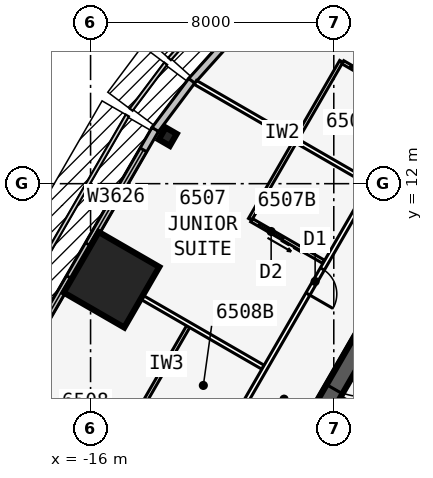
"""IFC4 building model, lengths in metres.
Left out: names, types, materials, properties, quantities, classifications, styles, units other than length and angle.
Written with IfcOpenShell. Run it as: python <this file> out.ifc"""

import sys

from ifc_helpers import new_model, si_unit, direction, frame, frame_2d, origin, origin_2d, place, context, subcontext, project, spatial, rectangle, i_section, extrude, element, fill, save


model = new_model("IFC4")
c1 = context("Model", 3, precision=1e-05, world=origin(), true_north=direction((0.0, 1.0)))
c2 = subcontext(c1, "Body", "Model", "MODEL_VIEW")
j1 = project(units=[si_unit("LENGTHUNIT", "METRE"), si_unit("PLANEANGLEUNIT", "RADIAN")], contexts=[c1])
p1 = place(None, origin())
s1 = spatial("IfcSite", under=j1, at=p1, CompositionType="ELEMENT")
p2 = place(p1, origin())
s2 = spatial("IfcBuilding", under=s1, at=p2, CompositionType="ELEMENT")
p3 = place(p2, frame((0.0, 0.0, 246.5)))
s3 = spatial("IfcBuildingStorey", under=s2, at=p3, CompositionType="ELEMENT", Elevation=246.5)
p4 = place(p3, frame((0.0, 19.052, 0.0), z_axis=(0.0, 0.0, 1.0), x_axis=(-0.499999749417, -0.866025548458, 0.0)))
e1 = element("IfcWall", 1, at=p4, inside=s3, PredefinedType="SHEAR", context=c2, shape_type="SweptSolid", body=[
    extrude(rectangle(XDim=33.0, YDim=0.6, at=frame_2d((16.5, 0.0))), origin(), (0.0, 0.0, 1.0), 3.6),
])
p5 = place(p4, frame((14.15, 0.0, 0.0)))
e2 = element("IfcOpeningElement", 2, at=p5, cuts=e1, PredefinedType="OPENING", context=c2, shape_type="SweptSolid", body=[
    extrude(rectangle(XDim=1.8, YDim=2.13, at=frame_2d((0.9, 1.065))), frame((0.0, 0.31, 0.0), z_axis=(0.0, -1.0, 0.0), x_axis=(1.0, 0.0, 0.0)), (0.0, 0.0, 1.0), 0.62),
])
p6 = place(p4, frame((12.6, 0.0, 0.0)))
e3 = element("IfcOpeningElement", 3, at=p6, cuts=e1, PredefinedType="OPENING", context=c2, shape_type="SweptSolid", body=[
    extrude(rectangle(XDim=1.0, YDim=2.13, at=frame_2d((0.5, 1.065))), frame((0.0, 0.31, 0.0), z_axis=(0.0, -1.0, 0.0), x_axis=(1.0, 0.0, 0.0)), (0.0, 0.0, 1.0), 0.62),
])
p7 = place(p3, frame((-4.979, 3.279, 0.0), z_axis=(0.0, 0.0, 1.0), x_axis=(-0.866027924134, 0.499995634601, 0.0)))
e4 = element("IfcWall", 4, at=p7, inside=s3, PredefinedType="SOLIDWALL", context=c2, shape_type="SweptSolid", body=[
    extrude(rectangle(XDim=3.275, YDim=0.2, at=frame_2d((1.637, 0.0))), origin(), (0.0, 0.0, 1.0), 3.435),
])
p8 = place(p3, frame((-13.461, 13.545, 0.0), z_axis=(0.0, 0.0, 1.0), x_axis=(-0.866025403784, 0.5, 0.0)))
e5 = element("IfcColumn", 5, at=p8, inside=s3, PredefinedType="COLUMN", context=c2, shape_type="SweptSolid", body=[
    extrude(i_section(OverallWidth=0.419, OverallDepth=0.455, WebThickness=0.042, FlangeThickness=0.068, at=origin_2d()), origin(), (0.0, 0.0, 1.0), 3.6),
])
p9 = place(p3, frame((-15.312, 8.84, 0.0), z_axis=(0.0, 0.0, 1.0), x_axis=(-0.866025403784, 0.5, 0.0)))
e6 = element("IfcColumn", 6, at=p9, inside=s3, PredefinedType="COLUMN", context=c2, shape_type="SweptSolid", body=[
    extrude(rectangle(XDim=2.3, YDim=2.3, at=origin_2d()), origin(), (0.0, 0.0, 1.0), 3.6),
])
p10 = place(p3, frame((-7.907, 20.701, 0.0), z_axis=(0.0, 0.0, 1.0), x_axis=(-0.667303550892, -0.744785855778, 0.0)))
e7 = element("IfcWall", 7, at=p10, inside=s3, PredefinedType="STANDARD", context=c2, shape_type="SweptSolid", body=[
    extrude(rectangle(XDim=7.153, YDim=0.25, at=frame_2d((3.576, 0.0))), origin(), (0.0, 0.0, 1.0), 3.435),
])
p11 = place(p10, frame((1.476, 0.0, 0.45)))
e8 = element("IfcOpeningElement", 8, at=p11, cuts=e7, PredefinedType="OPENING", context=c2, shape_type="SweptSolid", body=[
    extrude(rectangle(XDim=4.2, YDim=2.6, at=frame_2d((2.1, 1.3))), frame((0.0, 0.135, 0.0), z_axis=(0.0, -1.0, 0.0), x_axis=(1.0, 0.0, 0.0)), (0.0, 0.0, 1.0), 0.27),
])
p12 = place(p3, frame((-12.673, 15.382, 0.0), z_axis=(0.0, 0.0, 1.0), x_axis=(-0.599650843534, -0.800261748335, 0.0)))
e9 = element("IfcWall", 9, at=p12, inside=s3, PredefinedType="STANDARD", context=c2, shape_type="SweptSolid", body=[
    extrude(rectangle(XDim=2.014, YDim=0.25, at=frame_2d((1.007, 0.0))), origin(), (0.0, 0.0, 1.0), 3.435),
])
p13 = place(p3, frame((-13.873, 13.783, 0.0), z_axis=(0.0, 0.0, 1.0), x_axis=(-0.499993662806, -0.866029062534, 0.0)))
e10 = element("IfcWall", 10, at=p13, inside=s3, PredefinedType="STANDARD", context=c2, shape_type="SweptSolid", body=[
    extrude(rectangle(XDim=10.0, YDim=0.25, at=frame_2d((5.0, 0.0))), origin(), (0.0, 0.0, 1.0), 3.435),
])
p14 = place(p13, frame((0.775, 0.0, 0.45)))
e11 = element("IfcOpeningElement", 11, at=p14, cuts=e10, PredefinedType="OPENING", context=c2, shape_type="SweptSolid", body=[
    extrude(rectangle(XDim=3.6, YDim=2.6, at=frame_2d((1.8, 1.3))), frame((0.0, 0.135, 0.0), z_axis=(0.0, -1.0, 0.0), x_axis=(1.0, 0.0, 0.0)), (0.0, 0.0, 1.0), 0.27),
])
p15 = place(p13, frame((5.625, 0.0, 0.45)))
e12 = element("IfcOpeningElement", 12, at=p15, cuts=e10, PredefinedType="OPENING", context=c2, shape_type="SweptSolid", body=[
    extrude(rectangle(XDim=3.6, YDim=2.6, at=frame_2d((1.8, 1.3))), frame((0.0, 0.135, 0.0), z_axis=(0.0, -1.0, 0.0), x_axis=(1.0, 0.0, 0.0)), (0.0, 0.0, 1.0), 0.27),
])
p16 = place(p3, frame((-0.35, 23.096, 0.0), z_axis=(0.0, 0.0, 1.0), x_axis=(-0.499998875317, -0.866026053119, 0.0)))
e13 = element("IfcWall", 13, at=p16, inside=s3, PredefinedType="PARTITIONING", context=c2, shape_type="SweptSolid", body=[
    extrude(rectangle(XDim=39.654, YDim=0.15, at=frame_2d((19.827, 0.0))), origin(), (0.0, 0.0, 1.0), 3.435),
])
p17 = place(p16, frame((8.652, 0.0, 0.0)))
e14 = element("IfcOpeningElement", 14, at=p17, cuts=e13, PredefinedType="OPENING", context=c2, shape_type="SweptSolid", body=[
    extrude(rectangle(XDim=0.95, YDim=2.13, at=frame_2d((0.475, 1.065))), frame((0.0, 0.085, 0.0), z_axis=(0.0, -1.0, 0.0), x_axis=(1.0, 0.0, 0.0)), (0.0, 0.0, 1.0), 0.17),
])
p18 = place(p16, frame((16.052, 0.0, 0.0)))
e15 = element("IfcOpeningElement", 15, at=p18, cuts=e13, PredefinedType="OPENING", context=c2, shape_type="SweptSolid", body=[
    extrude(rectangle(XDim=0.95, YDim=2.13, at=frame_2d((0.475, 1.065))), frame((0.0, 0.085, 0.0), z_axis=(0.0, -1.0, 0.0), x_axis=(1.0, 0.0, 0.0)), (0.0, 0.0, 1.0), 0.17),
])
p19 = place(p16, frame((23.052, 0.0, 0.0)))
e16 = element("IfcOpeningElement", 16, at=p19, cuts=e13, PredefinedType="OPENING", context=c2, shape_type="SweptSolid", body=[
    extrude(rectangle(XDim=0.95, YDim=2.13, at=frame_2d((0.475, 1.065))), frame((0.0, 0.085, 0.0), z_axis=(0.0, -1.0, 0.0), x_axis=(1.0, 0.0, 0.0)), (0.0, 0.0, 1.0), 0.17),
])
p20 = place(p16, frame((30.052, 0.0, 0.0)))
e17 = element("IfcOpeningElement", 17, at=p20, cuts=e13, PredefinedType="OPENING", context=c2, shape_type="SweptSolid", body=[
    extrude(rectangle(XDim=0.95, YDim=2.13, at=frame_2d((0.475, 1.065))), frame((0.0, 0.085, 0.0), z_axis=(0.0, -1.0, 0.0), x_axis=(1.0, 0.0, 0.0)), (0.0, 0.0, 1.0), 0.17),
])
p21 = place(p3, frame((-6.829, 12.025, 0.0), z_axis=(0.0, 0.0, 1.0), x_axis=(-0.866029323189, 0.499993211332, 0.0)))
e18 = element("IfcWall", 18, at=p21, inside=s3, PredefinedType="PARTITIONING", context=c2, shape_type="SweptSolid", body=[
    extrude(rectangle(XDim=6.608, YDim=0.15, at=frame_2d((3.304, 0.0))), origin(), (0.0, 0.0, 1.0), 2.678),
])
p22 = place(p3, frame((-10.329, 5.963, 0.0), z_axis=(0.0, 0.0, 1.0), x_axis=(-0.866011785882, 0.500023586156, 0.0)))
e19 = element("IfcWall", 19, at=p22, inside=s3, PredefinedType="PARTITIONING", context=c2, shape_type="SweptSolid", body=[
    extrude(rectangle(XDim=6.854, YDim=0.15, at=frame_2d((3.427, 0.0))), origin(), (0.0, 0.0, 1.0), 2.678),
])
p23 = place(p3, frame((-7.753, 16.023, 0.0), z_axis=(0.0, 0.0, 1.0), x_axis=(-0.499990139034, -0.866031096941, 0.0)))
e20 = element("IfcWall", 20, at=p23, inside=s3, PredefinedType="PLUMBINGWALL", context=c2, shape_type="SweptSolid", body=[
    extrude(rectangle(XDim=3.0, YDim=0.12, at=frame_2d((1.5, 0.0))), origin(), (0.0, 0.0, 1.0), 3.435),
])
p24 = place(p3, frame((-5.329, 14.623, 0.0), z_axis=(0.0, 0.0, 1.0), x_axis=(-0.865997131366, 0.500048966069, 0.0)))
e21 = element("IfcWall", 21, at=p24, inside=s3, PredefinedType="PLUMBINGWALL", context=c2, shape_type="SweptSolid", body=[
    extrude(rectangle(XDim=2.74, YDim=0.12, at=frame_2d((1.37, 0.0))), origin(), (0.0, 0.0, 1.0), 3.435),
])
p25 = place(p24, frame((1.55, 0.0, 0.0)))
e22 = element("IfcOpeningElement", 22, at=p25, cuts=e21, PredefinedType="OPENING", context=c2, shape_type="SweptSolid", body=[
    extrude(rectangle(XDim=0.9, YDim=2.13, at=frame_2d((0.45, 1.065))), frame((0.0, 0.07, 0.0), z_axis=(0.0, -1.0, 0.0), x_axis=(1.0, 0.0, 0.0)), (0.0, 0.0, 1.0), 0.14),
])
p26 = place(p3, frame((-9.253, 13.425, 0.0), z_axis=(0.0, 0.0, 1.0), x_axis=(-0.499990139034, -0.866031096941, 0.0)))
e23 = element("IfcWall", 23, at=p26, inside=s3, PredefinedType="PLUMBINGWALL", context=c2, shape_type="SweptSolid", body=[
    extrude(rectangle(XDim=3.0, YDim=0.12, at=frame_2d((1.5, 0.0))), origin(), (0.0, 0.0, 1.0), 3.435),
])
p27 = place(p3, frame((-8.329, 9.427, 0.0), z_axis=(0.0, 0.0, 1.0), x_axis=(-0.866035715982, 0.499982138324, 0.0)))
e24 = element("IfcWall", 24, at=p27, inside=s3, PredefinedType="PLUMBINGWALL", context=c2, shape_type="SweptSolid", body=[
    extrude(rectangle(XDim=2.74, YDim=0.12, at=frame_2d((1.37, 0.0))), origin(), (0.0, 0.0, 1.0), 3.435),
])
p28 = place(p27, frame((1.55, 0.0, 0.0)))
e25 = element("IfcOpeningElement", 25, at=p28, cuts=e24, PredefinedType="OPENING", context=c2, shape_type="SweptSolid", body=[
    extrude(rectangle(XDim=0.9, YDim=2.13, at=frame_2d((0.45, 1.065))), frame((0.0, 0.07, 0.0), z_axis=(0.0, -1.0, 0.0), x_axis=(1.0, 0.0, 0.0)), (0.0, 0.0, 1.0), 0.14),
])
p29 = place(p3, frame((-12.753, 7.363, 0.0), z_axis=(0.0, 0.0, 1.0), x_axis=(-0.50002537861, -0.866010750942, 0.0)))
e26 = element("IfcWall", 26, at=p29, inside=s3, PredefinedType="PLUMBINGWALL", context=c2, shape_type="SweptSolid", body=[
    extrude(rectangle(XDim=3.0, YDim=0.12, at=frame_2d((1.5, 0.0))), origin(), (0.0, 0.0, 1.0), 3.435),
])
p30 = place(p14, origin())
e27 = element("IfcWindow", 27, at=p30, inside=s3, PartitioningType="SINGLE_PANEL", PredefinedType="WINDOW", context=c2, shape_type="SweptSolid", body=[
    extrude(rectangle(XDim=3.6, YDim=2.6, at=frame_2d((1.8, 1.3))), frame((0.0, 0.03, 0.0), z_axis=(0.0, -1.0, 0.0), x_axis=(1.0, 0.0, 0.0)), (0.0, 0.0, 1.0), 0.06),
])
fill(e11, e27)
p31 = place(p15, origin())
e28 = element("IfcWindow", 28, at=p31, inside=s3, PartitioningType="SINGLE_PANEL", PredefinedType="WINDOW", context=c2, shape_type="SweptSolid", body=[
    extrude(rectangle(XDim=3.6, YDim=2.6, at=frame_2d((1.8, 1.3))), frame((0.0, 0.03, 0.0), z_axis=(0.0, -1.0, 0.0), x_axis=(1.0, 0.0, 0.0)), (0.0, 0.0, 1.0), 0.06),
])
fill(e12, e28)
p32 = place(p25, origin())
e29 = element("IfcDoor", 29, at=p32, inside=s3, OperationType="SLIDING_TO_LEFT", PredefinedType="DOOR", context=c2, shape_type="SweptSolid", body=[
    extrude(rectangle(XDim=0.9, YDim=2.13, at=frame_2d((0.45, 1.065))), frame((0.0, 0.025, 0.0), z_axis=(0.0, -1.0, 0.0), x_axis=(1.0, 0.0, 0.0)), (0.0, 0.0, 1.0), 0.05),
])
fill(e22, e29)
p33 = place(p28, origin())
e30 = element("IfcDoor", 30, at=p33, inside=s3, OperationType="SLIDING_TO_LEFT", PredefinedType="DOOR", context=c2, shape_type="SweptSolid", body=[
    extrude(rectangle(XDim=0.9, YDim=2.13, at=frame_2d((0.45, 1.065))), frame((0.0, 0.025, 0.0), z_axis=(0.0, -1.0, 0.0), x_axis=(1.0, 0.0, 0.0)), (0.0, 0.0, 1.0), 0.05),
])
fill(e25, e30)
p34 = place(p18, origin())
e31 = element("IfcDoor", 31, at=p34, inside=s3, OperationType="SINGLE_SWING_RIGHT", PredefinedType="DOOR", context=c2, shape_type="SweptSolid", body=[
    extrude(rectangle(XDim=0.95, YDim=2.13, at=frame_2d((0.475, 1.065))), frame((0.0, 0.025, 0.0), z_axis=(0.0, -1.0, 0.0), x_axis=(1.0, 0.0, 0.0)), (0.0, 0.0, 1.0), 0.05),
])
fill(e15, e31)
p35 = place(p5, origin())
e32 = element("IfcDoor", 32, at=p35, inside=s3, OperationType="DOUBLE_DOOR_SINGLE_SWING", PredefinedType="DOOR", context=c2, shape_type="SweptSolid", body=[
    extrude(rectangle(XDim=1.8, YDim=2.13, at=frame_2d((0.9, 1.065))), frame((0.0, 0.025, 0.0), z_axis=(0.0, -1.0, 0.0), x_axis=(1.0, 0.0, 0.0)), (0.0, 0.0, 1.0), 0.05),
])
fill(e2, e32)
save(model, sys.argv[1])
